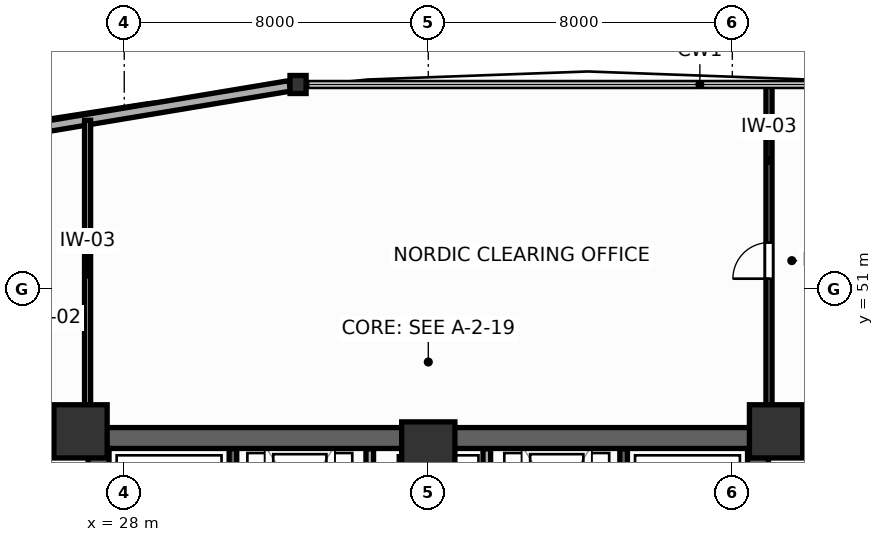
"""IFC4 building model, lengths in metres.
Left out: names, types, materials, properties, quantities, classifications, styles, units other than length and angle.
Written with IfcOpenShell. Run it as: python <this file> out.ifc"""

import sys

from ifc_helpers import new_model, si_unit, direction, frame, frame_2d, origin, origin_2d, place, context, subcontext, project, spatial, rectangle, i_section, extrude, source, transform, mapped, element, fill, save


model = new_model("IFC4")
c1 = context("Model", 3, precision=1e-05, world=origin(), true_north=direction((0.0, 1.0)))
c2 = subcontext(c1, "Body", "Model", "MODEL_VIEW")
j1 = project(units=[si_unit("LENGTHUNIT", "METRE"), si_unit("PLANEANGLEUNIT", "RADIAN")], contexts=[c1])
p1 = place(None, origin())
s1 = spatial("IfcSite", under=j1, at=p1, CompositionType="ELEMENT")
p2 = place(p1, origin())
s2 = spatial("IfcBuilding", under=s1, at=p2, CompositionType="ELEMENT")
p3 = place(p2, frame((0.0, 0.0, 71.7)))
s3 = spatial("IfcBuildingStorey", under=s2, at=p3, CompositionType="ELEMENT", Elevation=71.7)
p4 = place(p3, frame((27.05, 47.075, 0.0), z_axis=(0.0, 0.0, 1.0), x_axis=(1.0, 0.0, 0.0)))
e1 = element("IfcWall", 1, at=p4, inside=s3, PredefinedType="SHEAR", context=c2, shape_type="SweptSolid", body=[
    extrude(rectangle(XDim=17.9, YDim=0.55, at=frame_2d((8.95, 0.0))), origin(), (0.0, 0.0, 1.0), 3.9),
])
for number, where, z_axis, x_axis in (
    (2, (27.325, 37.8, 0.0), (0.0, 0.0, 1.0), (0.0, 1.0, 0.0)),
    (3, (44.675, 37.8, 0.0), (0.0, 0.0, 1.0), (0.0, 1.0, 0.0)),
):
    element("IfcWall", number, at=place(p3, frame(where, z_axis=z_axis, x_axis=x_axis)), inside=s3, PredefinedType="SHEAR", context=c2, shape_type="SweptSolid", body=[
        extrude(rectangle(XDim=9.0, YDim=0.55, at=frame_2d((4.5, 0.0))), origin(), (0.0, 0.0, 1.0), 3.9),
    ])
m1 = source(origin(), c2, "Body", "SweptSolid", [
    extrude(rectangle(XDim=1.4, YDim=1.4, at=origin_2d()), origin(), (0.0, 0.0, 1.0), 3.9),
])
for number, where, z_axis, x_axis in (
    (4, (26.85, 47.25, 0.0), (0.0, 0.0, 1.0), (1.0, 0.0, 0.0)),
    (5, (45.15, 47.25, 0.0), (0.0, 0.0, 1.0), (1.0, 0.0, 0.0)),
    (6, (36.0, 46.8, 0.0), (0.0, 0.0, 1.0), (1.0, 0.0, 0.0)),
):
    element("IfcColumn", number, at=place(p3, frame(where, z_axis=z_axis, x_axis=x_axis)), inside=s3, PredefinedType="COLUMN", context=c2, shape_type="MappedRepresentation", body=[
        mapped(m1, transform((0.0, 0.0, 0.0), scale=1.0)),
    ])
m2 = source(origin(), c2, "Body", "SweptSolid", [
    extrude(i_section(OverallWidth=0.424, OverallDepth=0.474, WebThickness=0.045, FlangeThickness=0.072, FilletRadius=0.015, at=origin_2d()), origin(), (0.0, 0.0, 1.0), 3.9),
])
p5 = place(p3, frame((32.573, 56.377, 0.0), z_axis=(0.0, 0.0, 1.0), x_axis=(1.0, 0.0, 0.0)))
e7 = element("IfcColumn", 7, at=p5, inside=s3, PredefinedType="COLUMN", context=c2, shape_type="MappedRepresentation", body=[
    mapped(m2, transform((0.0, 0.0, 0.0), scale=1.0)),
])
p6 = place(p3, frame((32.356, 56.341, 0.0), z_axis=(0.0, 0.0, 1.0), x_axis=(-0.986399895449, -0.16436315359, 0.0)))
e8 = element("IfcWall", 8, at=p6, inside=s3, PredefinedType="SOLIDWALL", context=c2, shape_type="SweptSolid", body=[
    extrude(rectangle(XDim=17.677, YDim=0.28, at=frame_2d((8.839, 0.0))), origin(), (0.0, 0.0, 1.0), 2.08),
])
p7 = place(p6, frame((7.989, 0.0, 0.75)))
e9 = element("IfcOpeningElement", 9, at=p7, cuts=e8, PredefinedType="OPENING", context=c2, shape_type="SweptSolid", body=[
    extrude(rectangle(XDim=1.7, YDim=1.15, at=frame_2d((0.85, 0.575))), frame((0.0, 0.15, 0.0), z_axis=(0.0, -1.0, 0.0), x_axis=(1.0, 0.0, 0.0)), (0.0, 0.0, 1.0), 0.3),
])
p8 = place(p3, frame((30.86, 37.81, 0.0), z_axis=(0.0, 0.0, 1.0), x_axis=(0.0, 1.0, 0.0)))
e10 = element("IfcWall", 10, at=p8, inside=s3, PredefinedType="SHEAR", context=c2, shape_type="SweptSolid", body=[
    extrude(rectangle(XDim=8.98, YDim=0.2, at=frame_2d((4.49, 0.0))), origin(), (0.0, 0.0, 1.0), 3.9),
])
p9 = place(p8, frame((0.82, 0.0, 0.0)))
e11 = element("IfcOpeningElement", 11, at=p9, cuts=e10, PredefinedType="OPENING", context=c2, shape_type="SweptSolid", body=[
    extrude(rectangle(XDim=1.05, YDim=2.1, at=frame_2d((0.525, 1.05))), frame((0.0, 0.11, 0.0), z_axis=(0.0, -1.0, 0.0), x_axis=(1.0, 0.0, 0.0)), (0.0, 0.0, 1.0), 0.22),
])
p10 = place(p3, frame((41.14, 37.81, 0.0), z_axis=(0.0, 0.0, 1.0), x_axis=(0.0, 1.0, 0.0)))
e12 = element("IfcWall", 12, at=p10, inside=s3, PredefinedType="SHEAR", context=c2, shape_type="SweptSolid", body=[
    extrude(rectangle(XDim=8.98, YDim=0.2, at=frame_2d((4.49, 0.0))), origin(), (0.0, 0.0, 1.0), 3.9),
])
p11 = place(p10, frame((0.82, 0.0, 0.0)))
e13 = element("IfcOpeningElement", 13, at=p11, cuts=e12, PredefinedType="OPENING", context=c2, shape_type="SweptSolid", body=[
    extrude(rectangle(XDim=1.05, YDim=2.1, at=frame_2d((0.525, 1.05))), frame((0.0, 0.11, 0.0), z_axis=(0.0, -1.0, 0.0), x_axis=(1.0, 0.0, 0.0)), (0.0, 0.0, 1.0), 0.22),
])
p12 = place(p3, frame((34.46, 37.81, 0.0), z_axis=(0.0, 0.0, 1.0), x_axis=(0.0, 1.0, 0.0)))
e14 = element("IfcWall", 14, at=p12, inside=s3, PredefinedType="PARTITIONING", context=c2, shape_type="SweptSolid", body=[
    extrude(rectangle(XDim=8.98, YDim=0.2, at=frame_2d((4.49, 0.0))), origin(), (0.0, 0.0, 1.0), 3.68),
])
p13 = place(p12, frame((0.65, 0.0, 0.0)))
e15 = element("IfcOpeningElement", 15, at=p13, cuts=e14, PredefinedType="OPENING", context=c2, shape_type="SweptSolid", body=[
    extrude(rectangle(XDim=0.85, YDim=2.05, at=frame_2d((0.425, 1.025))), frame((0.0, 0.11, 0.0), z_axis=(0.0, -1.0, 0.0), x_axis=(1.0, 0.0, 0.0)), (0.0, 0.0, 1.0), 0.22),
])
p14 = place(p3, frame((37.54, 37.81, 0.0), z_axis=(0.0, 0.0, 1.0), x_axis=(0.0, 1.0, 0.0)))
e16 = element("IfcWall", 16, at=p14, inside=s3, PredefinedType="PARTITIONING", context=c2, shape_type="SweptSolid", body=[
    extrude(rectangle(XDim=8.98, YDim=0.2, at=frame_2d((4.49, 0.0))), origin(), (0.0, 0.0, 1.0), 3.68),
])
p15 = place(p14, frame((0.65, 0.0, 0.0)))
e17 = element("IfcOpeningElement", 17, at=p15, cuts=e16, PredefinedType="OPENING", context=c2, shape_type="SweptSolid", body=[
    extrude(rectangle(XDim=0.85, YDim=2.05, at=frame_2d((0.425, 1.025))), frame((0.0, 0.11, 0.0), z_axis=(0.0, -1.0, 0.0), x_axis=(1.0, 0.0, 0.0)), (0.0, 0.0, 1.0), 0.22),
])
p16 = place(p3, frame((44.965, 47.34, 0.0), z_axis=(0.0, 0.0, 1.0), x_axis=(0.0, 1.0, 0.0)))
e18 = element("IfcWall", 18, at=p16, inside=s3, PredefinedType="PARTITIONING", context=c2, shape_type="SweptSolid", body=[
    extrude(rectangle(XDim=9.017, YDim=0.16, at=frame_2d((4.508, 0.0))), origin(), (0.0, 0.0, 1.0), 2.24),
])
p17 = place(p16, frame((3.927, 0.0, 0.0)))
e19 = element("IfcOpeningElement", 19, at=p17, cuts=e18, PredefinedType="OPENING", context=c2, shape_type="SweptSolid", body=[
    extrude(rectangle(XDim=0.95, YDim=2.05, at=frame_2d((0.475, 1.025))), frame((0.0, 0.09, 0.0), z_axis=(0.0, -1.0, 0.0), x_axis=(1.0, 0.0, 0.0)), (0.0, 0.0, 1.0), 0.18),
])
p18 = place(p3, frame((27.035, 47.34, 0.0), z_axis=(0.0, 0.0, 1.0), x_axis=(0.0, 1.0, 0.0)))
e20 = element("IfcWall", 20, at=p18, inside=s3, PredefinedType="PARTITIONING", context=c2, shape_type="SweptSolid", body=[
    extrude(rectangle(XDim=8.094, YDim=0.16, at=frame_2d((4.047, 0.0))), origin(), (0.0, 0.0, 1.0), 3.68),
])
p19 = place(p17, origin())
e21 = element("IfcDoor", 21, at=p19, inside=s3, OperationType="SINGLE_SWING_LEFT", PredefinedType="DOOR", context=c2, shape_type="SweptSolid", body=[
    extrude(rectangle(XDim=0.95, YDim=2.05, at=frame_2d((0.475, 1.025))), frame((0.0, 0.025, 0.0), z_axis=(0.0, -1.0, 0.0), x_axis=(1.0, 0.0, 0.0)), (0.0, 0.0, 1.0), 0.05),
])
fill(e19, e21)
save(model, sys.argv[1])
